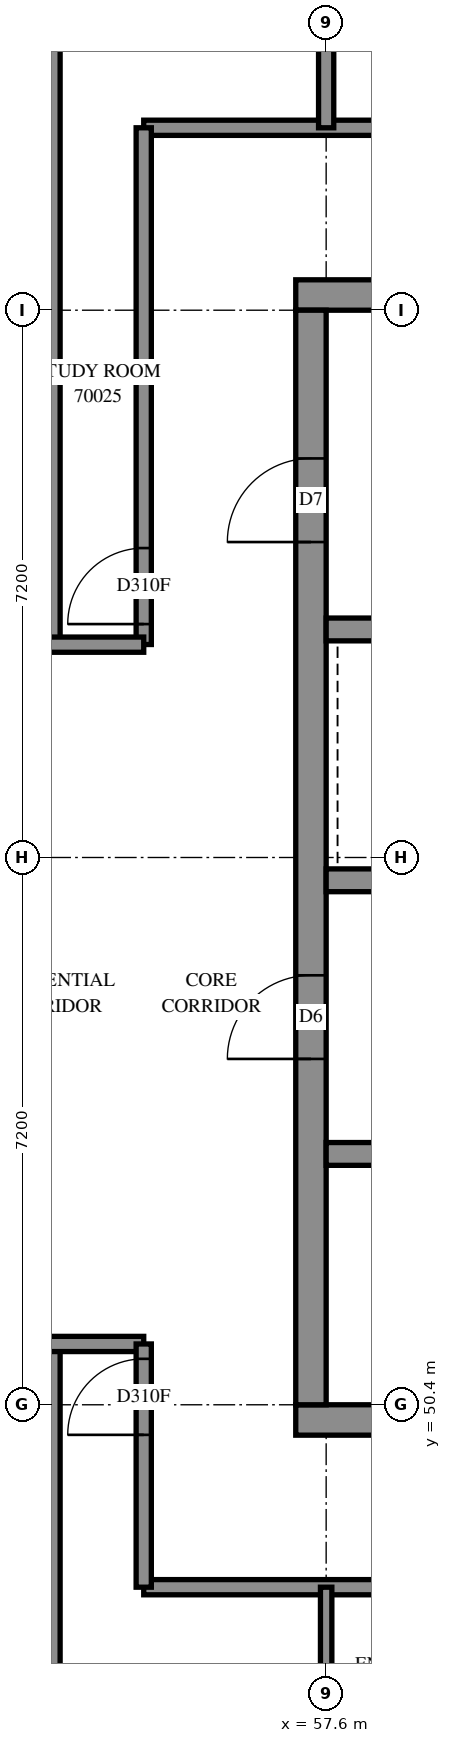
"""IFC4 building model, lengths in metres.
Left out: names, types, materials, properties, quantities, classifications, styles, units other than length and angle.
Written with IfcOpenShell. Run it as: python <this file> out.ifc"""

import sys

from ifc_helpers import new_model, si_unit, direction, frame, frame_2d, origin, place, context, subcontext, project, spatial, rectangle, extrude, element, fill, save


model = new_model("IFC4")
c1 = context("Model", 3, precision=1e-05, world=origin(), true_north=direction((0.0, 1.0)))
c2 = subcontext(c1, "Body", "Model", "MODEL_VIEW")
j1 = project(units=[si_unit("LENGTHUNIT", "METRE"), si_unit("PLANEANGLEUNIT", "RADIAN")], contexts=[c1])
p1 = place(None, origin())
s1 = spatial("IfcSite", under=j1, at=p1, CompositionType="ELEMENT")
p2 = place(p1, origin())
s2 = spatial("IfcBuilding", under=s1, at=p2, CompositionType="ELEMENT")
p3 = place(p2, frame((0.0, 0.0, 257.4)))
s3 = spatial("IfcBuildingStorey", under=s2, at=p3, CompositionType="ELEMENT", Elevation=257.4)
p4 = place(p3, frame((57.2, 50.2, -0.3), z_axis=(0.0, 0.0, 1.0), x_axis=(1.0, 0.0, 0.0)))
e1 = element("IfcWall", 1, at=p4, inside=s3, PredefinedType="SHEAR", context=c2, shape_type="SweptSolid", body=[
    extrude(rectangle(XDim=15.2, YDim=0.4, at=frame_2d((7.6, 0.0))), origin(), (0.0, 0.0, 1.0), 2.7),
])
p5 = place(p3, frame((57.2, 65.0, -0.3), z_axis=(0.0, 0.0, 1.0), x_axis=(1.0, 0.0, 0.0)))
e2 = element("IfcWall", 2, at=p5, inside=s3, PredefinedType="SHEAR", context=c2, shape_type="SweptSolid", body=[
    extrude(rectangle(XDim=15.2, YDim=0.4, at=frame_2d((7.6, 0.0))), origin(), (0.0, 0.0, 1.0), 2.7),
])
p6 = place(p5, frame((10.4, 0.0, 0.3)))
e3 = element("IfcOpeningElement", 3, at=p6, cuts=e2, PredefinedType="OPENING", context=c2, shape_type="SweptSolid", body=[
    extrude(rectangle(XDim=0.8, YDim=2.1, at=frame_2d((0.4, 1.05))), frame((0.0, 0.21, 0.0), z_axis=(0.0, -1.0, 0.0), x_axis=(1.0, 0.0, 0.0)), (0.0, 0.0, 1.0), 0.42),
])
p7 = place(p3, frame((57.4, 50.4, -0.3), z_axis=(0.0, 0.0, 1.0), x_axis=(0.0, 1.0, 0.0)))
e4 = element("IfcWall", 4, at=p7, inside=s3, PredefinedType="SHEAR", context=c2, shape_type="SweptSolid", body=[
    extrude(rectangle(XDim=14.4, YDim=0.4, at=frame_2d((7.2, 0.0))), origin(), (0.0, 0.0, 1.0), 2.7),
])
p8 = place(p7, frame((4.55, 0.0, 0.3)))
e5 = element("IfcOpeningElement", 5, at=p8, cuts=e4, PredefinedType="OPENING", context=c2, shape_type="SweptSolid", body=[
    extrude(rectangle(XDim=1.1, YDim=2.1, at=frame_2d((0.55, 1.05))), frame((0.0, 0.21, 0.0), z_axis=(0.0, -1.0, 0.0), x_axis=(1.0, 0.0, 0.0)), (0.0, 0.0, 1.0), 0.42),
])
p9 = place(p7, frame((11.35, 0.0, 0.3)))
e6 = element("IfcOpeningElement", 6, at=p9, cuts=e4, PredefinedType="OPENING", context=c2, shape_type="SweptSolid", body=[
    extrude(rectangle(XDim=1.1, YDim=2.1, at=frame_2d((0.55, 1.05))), frame((0.0, 0.21, 0.0), z_axis=(0.0, -1.0, 0.0), x_axis=(1.0, 0.0, 0.0)), (0.0, 0.0, 1.0), 0.42),
])
p10 = place(p3, frame((57.6, 53.7, 0.0), z_axis=(0.0, 0.0, 1.0), x_axis=(1.0, 0.0, 0.0)))
e7 = element("IfcWall", 7, at=p10, inside=s3, PredefinedType="SOLIDWALL", context=c2, shape_type="SweptSolid", body=[
    extrude(rectangle(XDim=14.4, YDim=0.3, at=frame_2d((7.2, 0.0))), origin(), (0.0, 0.0, 1.0), 3.1),
])
p11 = place(p10, frame((1.35, 0.0, 0.0)))
e8 = element("IfcOpeningElement", 8, at=p11, cuts=e7, PredefinedType="OPENING", context=c2, shape_type="SweptSolid", body=[
    extrude(rectangle(XDim=0.9, YDim=2.1, at=frame_2d((0.45, 1.05))), frame((0.0, 0.16, 0.0), z_axis=(0.0, -1.0, 0.0), x_axis=(1.0, 0.0, 0.0)), (0.0, 0.0, 1.0), 0.32),
])
p12 = place(p10, frame((4.95, 0.0, 0.0)))
e9 = element("IfcOpeningElement", 9, at=p12, cuts=e7, PredefinedType="OPENING", context=c2, shape_type="SweptSolid", body=[
    extrude(rectangle(XDim=0.9, YDim=2.1, at=frame_2d((0.45, 1.05))), frame((0.0, 0.16, 0.0), z_axis=(0.0, -1.0, 0.0), x_axis=(1.0, 0.0, 0.0)), (0.0, 0.0, 1.0), 0.32),
])
p13 = place(p10, frame((8.55, 0.0, 0.0)))
e10 = element("IfcOpeningElement", 10, at=p13, cuts=e7, PredefinedType="OPENING", context=c2, shape_type="SweptSolid", body=[
    extrude(rectangle(XDim=0.9, YDim=2.1, at=frame_2d((0.45, 1.05))), frame((0.0, 0.16, 0.0), z_axis=(0.0, -1.0, 0.0), x_axis=(1.0, 0.0, 0.0)), (0.0, 0.0, 1.0), 0.32),
])
p14 = place(p10, frame((12.05, 0.0, 0.0)))
e11 = element("IfcOpeningElement", 11, at=p14, cuts=e7, PredefinedType="OPENING", context=c2, shape_type="SweptSolid", body=[
    extrude(rectangle(XDim=1.1, YDim=2.1, at=frame_2d((0.55, 1.05))), frame((0.0, 0.16, 0.0), z_axis=(0.0, -1.0, 0.0), x_axis=(1.0, 0.0, 0.0)), (0.0, 0.0, 1.0), 0.32),
])
p15 = place(p3, frame((57.6, 57.3, 0.0), z_axis=(0.0, 0.0, 1.0), x_axis=(1.0, 0.0, 0.0)))
e12 = element("IfcWall", 12, at=p15, inside=s3, PredefinedType="SOLIDWALL", context=c2, shape_type="SweptSolid", body=[
    extrude(rectangle(XDim=14.4, YDim=0.3, at=frame_2d((7.2, 0.0))), origin(), (0.0, 0.0, 1.0), 3.1),
])
p16 = place(p15, frame((8.55, 0.0, 0.0)))
e13 = element("IfcOpeningElement", 13, at=p16, cuts=e12, PredefinedType="OPENING", context=c2, shape_type="SweptSolid", body=[
    extrude(rectangle(XDim=0.9, YDim=2.1, at=frame_2d((0.45, 1.05))), frame((0.0, 0.16, 0.0), z_axis=(0.0, -1.0, 0.0), x_axis=(1.0, 0.0, 0.0)), (0.0, 0.0, 1.0), 0.32),
])
p17 = place(p15, frame((1.25, 0.0, 0.0)))
e14 = element("IfcOpeningElement", 14, at=p17, cuts=e12, PredefinedType="OPENING", context=c2, shape_type="SweptSolid", body=[
    extrude(rectangle(XDim=1.1, YDim=2.1, at=frame_2d((0.55, 1.05))), frame((0.0, 0.16, 0.0), z_axis=(0.0, -1.0, 0.0), x_axis=(1.0, 0.0, 0.0)), (0.0, 0.0, 1.0), 0.32),
])
p18 = place(p15, frame((4.85, 0.0, 0.0)))
e15 = element("IfcOpeningElement", 15, at=p18, cuts=e12, PredefinedType="OPENING", context=c2, shape_type="SweptSolid", body=[
    extrude(rectangle(XDim=1.1, YDim=2.1, at=frame_2d((0.55, 1.05))), frame((0.0, 0.16, 0.0), z_axis=(0.0, -1.0, 0.0), x_axis=(1.0, 0.0, 0.0)), (0.0, 0.0, 1.0), 0.32),
])
p19 = place(p15, frame((12.05, 0.0, 0.0)))
e16 = element("IfcOpeningElement", 16, at=p19, cuts=e12, PredefinedType="OPENING", context=c2, shape_type="SweptSolid", body=[
    extrude(rectangle(XDim=1.1, YDim=2.1, at=frame_2d((0.55, 1.05))), frame((0.0, 0.16, 0.0), z_axis=(0.0, -1.0, 0.0), x_axis=(1.0, 0.0, 0.0)), (0.0, 0.0, 1.0), 0.32),
])
p20 = place(p3, frame((57.6, 60.6, 0.0), z_axis=(0.0, 0.0, 1.0), x_axis=(1.0, 0.0, 0.0)))
e17 = element("IfcWall", 17, at=p20, inside=s3, PredefinedType="SOLIDWALL", context=c2, shape_type="SweptSolid", body=[
    extrude(rectangle(XDim=7.2, YDim=0.3, at=frame_2d((3.6, 0.0))), origin(), (0.0, 0.0, 1.0), 3.1),
])
p21 = place(p3, frame((55.2, 67.2, 0.0), z_axis=(0.0, 0.0, 1.0), x_axis=(1.0, 0.0, 0.0)))
e18 = element("IfcWall", 18, at=p21, inside=s3, PredefinedType="PARTITIONING", context=c2, shape_type="SweptSolid", body=[
    extrude(rectangle(XDim=19.2, YDim=0.2, at=frame_2d((9.6, 0.0))), origin(), (0.0, 0.0, 1.0), 3.1),
])
p22 = place(p21, frame((4.475, 0.0, 0.0)))
e19 = element("IfcOpeningElement", 19, at=p22, cuts=e18, PredefinedType="OPENING", context=c2, shape_type="SweptSolid", body=[
    extrude(rectangle(XDim=1.0, YDim=2.1, at=frame_2d((0.5, 1.05))), frame((0.0, 0.11, 0.0), z_axis=(0.0, -1.0, 0.0), x_axis=(1.0, 0.0, 0.0)), (0.0, 0.0, 1.0), 0.22),
])
p23 = place(p21, frame((8.301, 0.0, 0.0)))
e20 = element("IfcOpeningElement", 20, at=p23, cuts=e18, PredefinedType="OPENING", context=c2, shape_type="SweptSolid", body=[
    extrude(rectangle(XDim=0.9, YDim=2.1, at=frame_2d((0.45, 1.05))), frame((0.0, 0.11, 0.0), z_axis=(0.0, -1.0, 0.0), x_axis=(1.0, 0.0, 0.0)), (0.0, 0.0, 1.0), 0.22),
])
p24 = place(p21, frame((13.88, 0.0, 0.0)))
e21 = element("IfcOpeningElement", 21, at=p24, cuts=e18, PredefinedType="OPENING", context=c2, shape_type="SweptSolid", body=[
    extrude(rectangle(XDim=1.0, YDim=2.1, at=frame_2d((0.5, 1.05))), frame((0.0, 0.11, 0.0), z_axis=(0.0, -1.0, 0.0), x_axis=(1.0, 0.0, 0.0)), (0.0, 0.0, 1.0), 0.22),
])
p25 = place(p3, frame((55.2, 48.0, 0.0), z_axis=(0.0, 0.0, 1.0), x_axis=(1.0, 0.0, 0.0)))
e22 = element("IfcWall", 22, at=p25, inside=s3, PredefinedType="PARTITIONING", context=c2, shape_type="SweptSolid", body=[
    extrude(rectangle(XDim=19.15, YDim=0.2, at=frame_2d((9.575, 0.0))), origin(), (0.0, 0.0, 1.0), 3.1),
])
p26 = place(p25, frame((6.343, 0.0, 0.0)))
e23 = element("IfcOpeningElement", 23, at=p26, cuts=e22, PredefinedType="OPENING", context=c2, shape_type="SweptSolid", body=[
    extrude(rectangle(XDim=0.9, YDim=2.1, at=frame_2d((0.45, 1.05))), frame((0.0, 0.11, 0.0), z_axis=(0.0, -1.0, 0.0), x_axis=(1.0, 0.0, 0.0)), (0.0, 0.0, 1.0), 0.22),
])
p27 = place(p25, frame((11.633, 0.0, 0.0)))
e24 = element("IfcOpeningElement", 24, at=p27, cuts=e22, PredefinedType="OPENING", context=c2, shape_type="SweptSolid", body=[
    extrude(rectangle(XDim=1.0, YDim=2.1, at=frame_2d((0.5, 1.05))), frame((0.0, 0.11, 0.0), z_axis=(0.0, -1.0, 0.0), x_axis=(1.0, 0.0, 0.0)), (0.0, 0.0, 1.0), 0.22),
])
p28 = place(p25, frame((13.707, 0.0, 0.0)))
e25 = element("IfcOpeningElement", 25, at=p28, cuts=e22, PredefinedType="OPENING", context=c2, shape_type="SweptSolid", body=[
    extrude(rectangle(XDim=1.0, YDim=2.1, at=frame_2d((0.5, 1.05))), frame((0.0, 0.11, 0.0), z_axis=(0.0, -1.0, 0.0), x_axis=(1.0, 0.0, 0.0)), (0.0, 0.0, 1.0), 0.22),
])
p29 = place(p3, frame((54.0, 60.4, 0.0), z_axis=(0.0, 0.0, 1.0), x_axis=(0.0, 1.0, 0.0)))
e26 = element("IfcWall", 26, at=p29, inside=s3, PredefinedType="PARTITIONING", context=c2, shape_type="SweptSolid", body=[
    extrude(rectangle(XDim=12.419, YDim=0.2, at=frame_2d((6.21, 0.0))), origin(), (0.0, 0.0, 1.0), 3.1),
])
p30 = place(p3, frame((54.0, 42.312, 0.0), z_axis=(0.0, 0.0, 1.0), x_axis=(0.0, 1.0, 0.0)))
e27 = element("IfcWall", 27, at=p30, inside=s3, PredefinedType="PARTITIONING", context=c2, shape_type="SweptSolid", body=[
    extrude(rectangle(XDim=8.888, YDim=0.2, at=frame_2d((4.444, 0.0))), origin(), (0.0, 0.0, 1.0), 3.1),
])
p31 = place(p3, frame((55.2, 60.402, 0.0), z_axis=(0.0, 0.0, 1.0), x_axis=(0.0, 1.0, 0.0)))
e28 = element("IfcWall", 28, at=p31, inside=s3, PredefinedType="PARTITIONING", context=c2, shape_type="SweptSolid", body=[
    extrude(rectangle(XDim=6.798, YDim=0.2, at=frame_2d((3.399, 0.0))), origin(), (0.0, 0.0, 1.0), 3.1),
])
p32 = place(p31, frame((0.269, 0.0, 0.0)))
e29 = element("IfcOpeningElement", 29, at=p32, cuts=e28, PredefinedType="OPENING", context=c2, shape_type="SweptSolid", body=[
    extrude(rectangle(XDim=1.0, YDim=2.1, at=frame_2d((0.5, 1.05))), frame((0.0, 0.11, 0.0), z_axis=(0.0, -1.0, 0.0), x_axis=(1.0, 0.0, 0.0)), (0.0, 0.0, 1.0), 0.22),
])
p33 = place(p3, frame((57.6, 67.2, 0.0), z_axis=(0.0, 0.0, 1.0), x_axis=(0.0, 1.0, 0.0)))
e30 = element("IfcWall", 30, at=p33, inside=s3, PredefinedType="PARTITIONING", context=c2, shape_type="SweptSolid", body=[
    extrude(rectangle(XDim=4.45, YDim=0.2, at=frame_2d((2.225, 0.0))), origin(), (0.0, 0.0, 1.0), 3.1),
])
p34 = place(p3, frame((50.85, 51.2, 0.0), z_axis=(0.0, 0.0, 1.0), x_axis=(1.0, 0.0, 0.0)))
e31 = element("IfcWall", 31, at=p34, inside=s3, PredefinedType="PARTITIONING", context=c2, shape_type="SweptSolid", body=[
    extrude(rectangle(XDim=4.35, YDim=0.2, at=frame_2d((2.175, 0.0))), origin(), (0.0, 0.0, 1.0), 3.1),
])
p35 = place(p34, frame((1.931, 0.0, 0.0)))
e32 = element("IfcOpeningElement", 32, at=p35, cuts=e31, PredefinedType="OPENING", context=c2, shape_type="SweptSolid", body=[
    extrude(rectangle(XDim=1.0, YDim=2.1, at=frame_2d((0.5, 1.05))), frame((0.0, 0.11, 0.0), z_axis=(0.0, -1.0, 0.0), x_axis=(1.0, 0.0, 0.0)), (0.0, 0.0, 1.0), 0.22),
])
p36 = place(p3, frame((50.85, 60.4, 0.0), z_axis=(0.0, 0.0, 1.0), x_axis=(1.0, 0.0, 0.0)))
e33 = element("IfcWall", 33, at=p36, inside=s3, PredefinedType="PARTITIONING", context=c2, shape_type="SweptSolid", body=[
    extrude(rectangle(XDim=4.35, YDim=0.2, at=frame_2d((2.175, 0.0))), origin(), (0.0, 0.0, 1.0), 3.1),
])
p37 = place(p36, frame((1.946, 0.0, 0.0)))
e34 = element("IfcOpeningElement", 34, at=p37, cuts=e33, PredefinedType="OPENING", context=c2, shape_type="SweptSolid", body=[
    extrude(rectangle(XDim=1.0, YDim=2.1, at=frame_2d((0.5, 1.05))), frame((0.0, 0.11, 0.0), z_axis=(0.0, -1.0, 0.0), x_axis=(1.0, 0.0, 0.0)), (0.0, 0.0, 1.0), 0.22),
])
p38 = place(p3, frame((55.2, 48.0, 0.0), z_axis=(0.0, 0.0, 1.0), x_axis=(0.0, 1.0, 0.0)))
e35 = element("IfcWall", 35, at=p38, inside=s3, PredefinedType="PARTITIONING", context=c2, shape_type="SweptSolid", body=[
    extrude(rectangle(XDim=3.2, YDim=0.2, at=frame_2d((1.6, 0.0))), origin(), (0.0, 0.0, 1.0), 3.1),
])
p39 = place(p38, frame((2.004, 0.0, 0.0)))
e36 = element("IfcOpeningElement", 36, at=p39, cuts=e35, PredefinedType="OPENING", context=c2, shape_type="SweptSolid", body=[
    extrude(rectangle(XDim=1.0, YDim=2.1, at=frame_2d((0.5, 1.05))), frame((0.0, 0.11, 0.0), z_axis=(0.0, -1.0, 0.0), x_axis=(1.0, 0.0, 0.0)), (0.0, 0.0, 1.0), 0.22),
])
p40 = place(p3, frame((57.6, 45.6, 0.0), z_axis=(0.0, 0.0, 1.0), x_axis=(0.0, 1.0, 0.0)))
e37 = element("IfcWall", 37, at=p40, inside=s3, PredefinedType="PARTITIONING", context=c2, shape_type="SweptSolid", body=[
    extrude(rectangle(XDim=2.4, YDim=0.15, at=frame_2d((1.2, 0.0))), origin(), (0.0, 0.0, 1.0), 3.1),
])
p41 = place(p8, origin())
e38 = element("IfcDoor", 38, at=p41, inside=s3, OperationType="DOUBLE_DOOR_SINGLE_SWING", PredefinedType="DOOR", context=c2, shape_type="SweptSolid", body=[
    extrude(rectangle(XDim=1.1, YDim=2.1, at=frame_2d((0.55, 1.05))), frame((0.0, 0.025, 0.0), z_axis=(0.0, -1.0, 0.0), x_axis=(1.0, 0.0, 0.0)), (0.0, 0.0, 1.0), 0.05),
])
fill(e5, e38)
p42 = place(p9, origin())
e39 = element("IfcDoor", 39, at=p42, inside=s3, OperationType="SINGLE_SWING_LEFT", PredefinedType="DOOR", context=c2, shape_type="SweptSolid", body=[
    extrude(rectangle(XDim=1.1, YDim=2.1, at=frame_2d((0.55, 1.05))), frame((0.0, 0.025, 0.0), z_axis=(0.0, -1.0, 0.0), x_axis=(1.0, 0.0, 0.0)), (0.0, 0.0, 1.0), 0.05),
])
fill(e6, e39)
p43 = place(p39, origin())
e40 = element("IfcDoor", 40, at=p43, inside=s3, OperationType="SINGLE_SWING_RIGHT", PredefinedType="DOOR", context=c2, shape_type="SweptSolid", body=[
    extrude(rectangle(XDim=1.0, YDim=2.1, at=frame_2d((0.5, 1.05))), frame((0.0, 0.025, 0.0), z_axis=(0.0, -1.0, 0.0), x_axis=(1.0, 0.0, 0.0)), (0.0, 0.0, 1.0), 0.05),
])
fill(e36, e40)
p44 = place(p32, origin())
e41 = element("IfcDoor", 41, at=p44, inside=s3, OperationType="SINGLE_SWING_LEFT", PredefinedType="DOOR", context=c2, shape_type="SweptSolid", body=[
    extrude(rectangle(XDim=1.0, YDim=2.1, at=frame_2d((0.5, 1.05))), frame((0.0, 0.025, 0.0), z_axis=(0.0, -1.0, 0.0), x_axis=(1.0, 0.0, 0.0)), (0.0, 0.0, 1.0), 0.05),
])
fill(e29, e41)
save(model, sys.argv[1])
